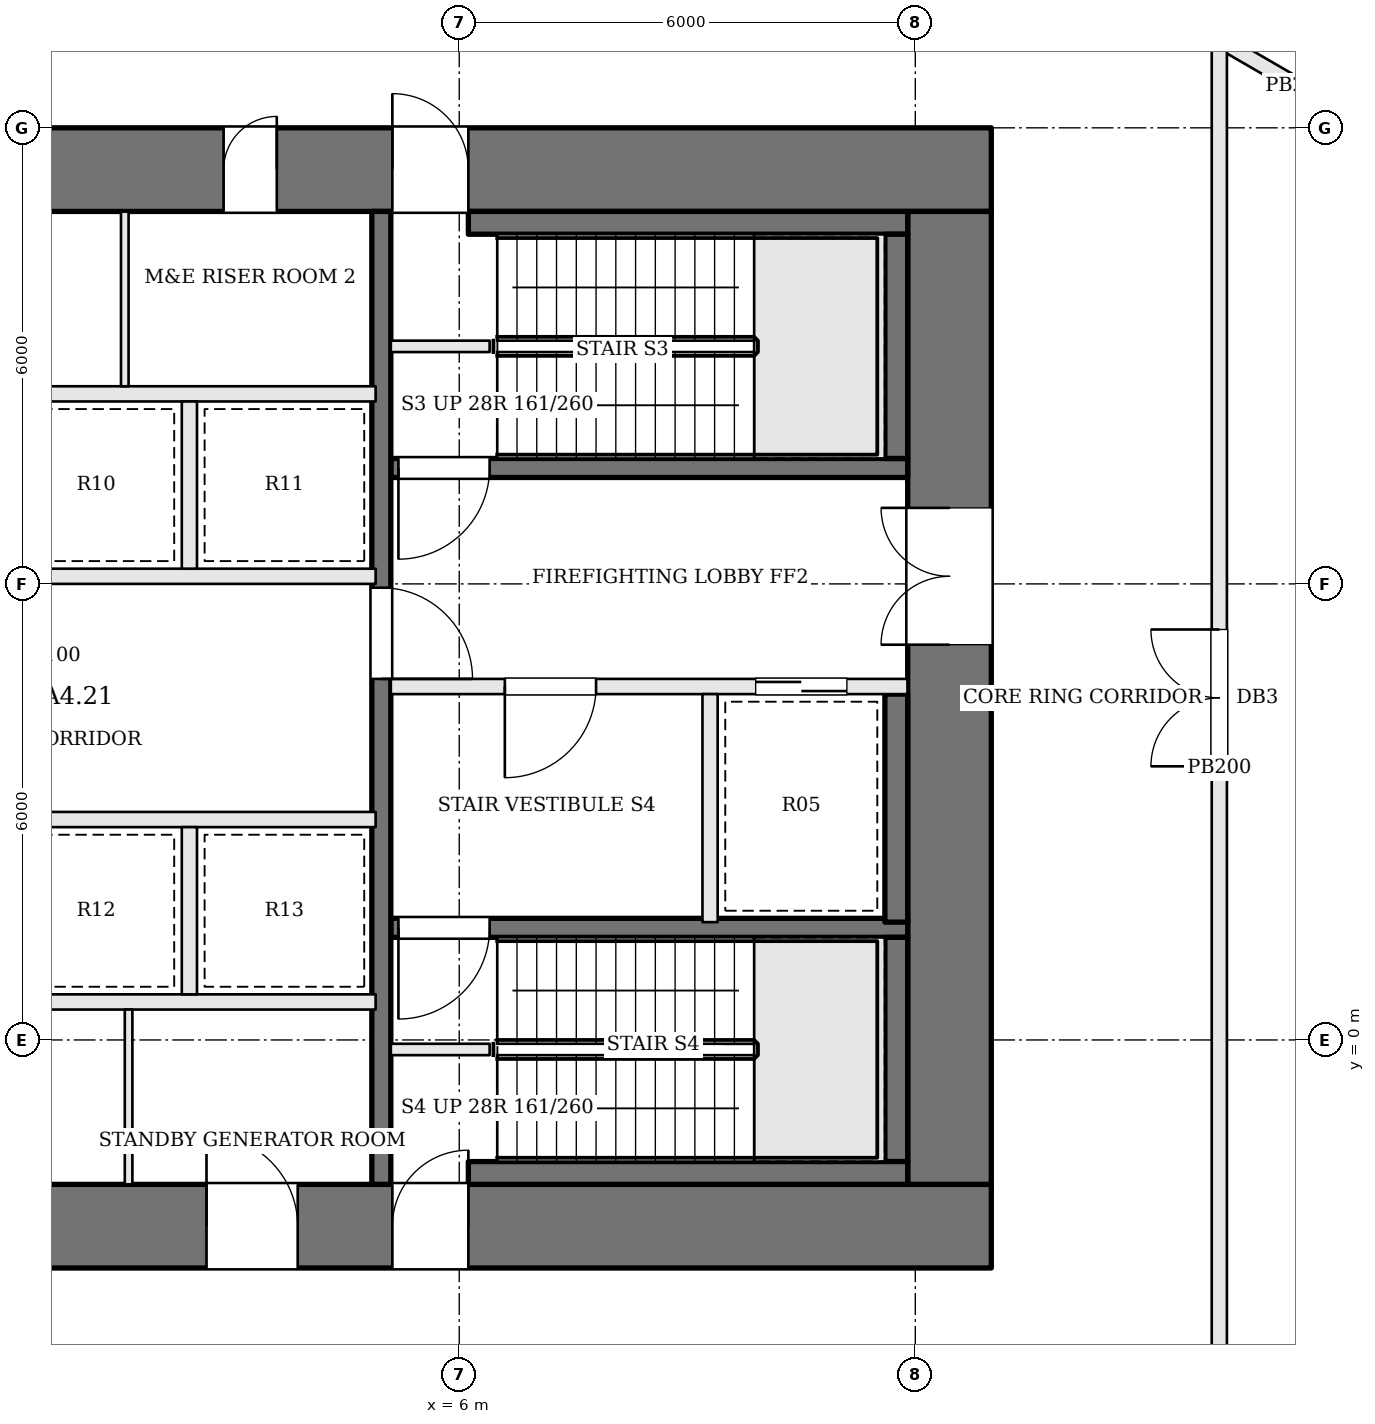
"""IFC4 building model, lengths in metres.
Left out: names, types, materials, properties, quantities, classifications, styles, units other than length and angle.
Written with IfcOpenShell. Run it as: python <this file> out.ifc"""

import sys

from ifc_helpers import new_model, si_unit, direction, frame, frame_2d, origin, place, context, subcontext, project, spatial, rectangle, extrude, element, fill, save


model = new_model("IFC4")
c1 = context("Model", 3, precision=1e-05, world=origin(), true_north=direction((0.0, 1.0)))
c2 = subcontext(c1, "Body", "Model", "MODEL_VIEW")
j1 = project(units=[si_unit("LENGTHUNIT", "METRE"), si_unit("PLANEANGLEUNIT", "RADIAN")], contexts=[c1])
p1 = place(None, origin())
s1 = spatial("IfcSite", under=j1, at=p1, CompositionType="ELEMENT")
p2 = place(p1, origin())
s2 = spatial("IfcBuilding", under=s1, at=p2, CompositionType="ELEMENT")
p3 = place(p2, frame((0.0, 0.0, 77.1)))
s3 = spatial("IfcBuildingStorey", under=s2, at=p3, CompositionType="ELEMENT", Elevation=77.1)
p4 = place(p3, frame((-13.0, 11.45, 0.0), z_axis=(0.0, 0.0, 1.0), x_axis=(1.0, 0.0, 0.0)))
e1 = element("IfcWall", 1, at=p4, inside=s3, PredefinedType="SHEAR", context=c2, shape_type="SweptSolid", body=[
    extrude(rectangle(XDim=26.0, YDim=1.1, at=frame_2d((13.0, 0.0))), origin(), (0.0, 0.0, 1.0), 4.5),
])
p5 = place(p4, frame((9.125, 0.0, 0.0)))
e2 = element("IfcOpeningElement", 2, at=p5, cuts=e1, PredefinedType="OPENING", context=c2, shape_type="SweptSolid", body=[
    extrude(rectangle(XDim=1.2, YDim=2.1, at=frame_2d((0.6, 1.05))), frame((0.0, 0.56, 0.0), z_axis=(0.0, -1.0, 0.0), x_axis=(1.0, 0.0, 0.0)), (0.0, 0.0, 1.0), 1.12),
])
p6 = place(p4, frame((12.375, 0.0, 0.0)))
e3 = element("IfcOpeningElement", 3, at=p6, cuts=e1, PredefinedType="OPENING", context=c2, shape_type="SweptSolid", body=[
    extrude(rectangle(XDim=1.2, YDim=2.1, at=frame_2d((0.6, 1.05))), frame((0.0, 0.56, 0.0), z_axis=(0.0, -1.0, 0.0), x_axis=(1.0, 0.0, 0.0)), (0.0, 0.0, 1.0), 1.12),
])
p7 = place(p4, frame((15.9, 0.0, 0.0)))
e4 = element("IfcOpeningElement", 4, at=p7, cuts=e1, PredefinedType="OPENING", context=c2, shape_type="SweptSolid", body=[
    extrude(rectangle(XDim=0.7, YDim=2.1, at=frame_2d((0.35, 1.05))), frame((0.0, 0.56, 0.0), z_axis=(0.0, -1.0, 0.0), x_axis=(1.0, 0.0, 0.0)), (0.0, 0.0, 1.0), 1.12),
])
p8 = place(p4, frame((6.88, 0.0, 0.0)))
e5 = element("IfcOpeningElement", 5, at=p8, cuts=e1, PredefinedType="OPENING", context=c2, shape_type="SweptSolid", body=[
    extrude(rectangle(XDim=1.0, YDim=2.1, at=frame_2d((0.5, 1.05))), frame((0.0, 0.56, 0.0), z_axis=(0.0, -1.0, 0.0), x_axis=(1.0, 0.0, 0.0)), (0.0, 0.0, 1.0), 1.12),
])
p9 = place(p4, frame((18.12, 0.0, 0.0)))
e6 = element("IfcOpeningElement", 6, at=p9, cuts=e1, PredefinedType="OPENING", context=c2, shape_type="SweptSolid", body=[
    extrude(rectangle(XDim=1.0, YDim=2.1, at=frame_2d((0.5, 1.05))), frame((0.0, 0.56, 0.0), z_axis=(0.0, -1.0, 0.0), x_axis=(1.0, 0.0, 0.0)), (0.0, 0.0, 1.0), 1.12),
])
p10 = place(p3, frame((-13.0, -2.45, 0.0), z_axis=(0.0, 0.0, 1.0), x_axis=(1.0, 0.0, 0.0)))
e7 = element("IfcWall", 7, at=p10, inside=s3, PredefinedType="SHEAR", context=c2, shape_type="SweptSolid", body=[
    extrude(rectangle(XDim=26.0, YDim=1.1, at=frame_2d((13.0, 0.0))), origin(), (0.0, 0.0, 1.0), 4.5),
])
p11 = place(p10, frame((8.975, 0.0, 0.0)))
e8 = element("IfcOpeningElement", 8, at=p11, cuts=e7, PredefinedType="OPENING", context=c2, shape_type="SweptSolid", body=[
    extrude(rectangle(XDim=0.7, YDim=2.1, at=frame_2d((0.35, 1.05))), frame((0.0, 0.56, 0.0), z_axis=(0.0, -1.0, 0.0), x_axis=(1.0, 0.0, 0.0)), (0.0, 0.0, 1.0), 1.12),
])
p12 = place(p10, frame((12.0, 0.0, 0.0)))
e9 = element("IfcOpeningElement", 9, at=p12, cuts=e7, PredefinedType="OPENING", context=c2, shape_type="SweptSolid", body=[
    extrude(rectangle(XDim=1.2, YDim=2.1, at=frame_2d((0.6, 1.05))), frame((0.0, 0.56, 0.0), z_axis=(0.0, -1.0, 0.0), x_axis=(1.0, 0.0, 0.0)), (0.0, 0.0, 1.0), 1.12),
])
p13 = place(p10, frame((15.675, 0.0, 0.0)))
e10 = element("IfcOpeningElement", 10, at=p13, cuts=e7, PredefinedType="OPENING", context=c2, shape_type="SweptSolid", body=[
    extrude(rectangle(XDim=1.2, YDim=2.1, at=frame_2d((0.6, 1.05))), frame((0.0, 0.56, 0.0), z_axis=(0.0, -1.0, 0.0), x_axis=(1.0, 0.0, 0.0)), (0.0, 0.0, 1.0), 1.12),
])
p14 = place(p10, frame((6.88, 0.0, 0.0)))
e11 = element("IfcOpeningElement", 11, at=p14, cuts=e7, PredefinedType="OPENING", context=c2, shape_type="SweptSolid", body=[
    extrude(rectangle(XDim=1.0, YDim=2.1, at=frame_2d((0.5, 1.05))), frame((0.0, 0.56, 0.0), z_axis=(0.0, -1.0, 0.0), x_axis=(1.0, 0.0, 0.0)), (0.0, 0.0, 1.0), 1.12),
])
p15 = place(p10, frame((18.12, 0.0, 0.0)))
e12 = element("IfcOpeningElement", 12, at=p15, cuts=e7, PredefinedType="OPENING", context=c2, shape_type="SweptSolid", body=[
    extrude(rectangle(XDim=1.0, YDim=2.1, at=frame_2d((0.5, 1.05))), frame((0.0, 0.56, 0.0), z_axis=(0.0, -1.0, 0.0), x_axis=(1.0, 0.0, 0.0)), (0.0, 0.0, 1.0), 1.12),
])
p16 = place(p3, frame((12.45, -1.9, 0.0), z_axis=(0.0, 0.0, 1.0), x_axis=(0.0, 1.0, 0.0)))
e13 = element("IfcWall", 13, at=p16, inside=s3, PredefinedType="SHEAR", context=c2, shape_type="SweptSolid", body=[
    extrude(rectangle(XDim=12.8, YDim=1.1, at=frame_2d((6.4, 0.0))), origin(), (0.0, 0.0, 1.0), 4.5),
])
p17 = place(p16, frame((7.1, 0.0, 0.0)))
e14 = element("IfcOpeningElement", 14, at=p17, cuts=e13, PredefinedType="OPENING", context=c2, shape_type="SweptSolid", body=[
    extrude(rectangle(XDim=1.8, YDim=2.1, at=frame_2d((0.9, 1.05))), frame((0.0, 0.56, 0.0), z_axis=(0.0, -1.0, 0.0), x_axis=(1.0, 0.0, 0.0)), (0.0, 0.0, 1.0), 1.12),
])
for number, where, z_axis, x_axis in (
    (15, (6.4, 9.125, 0.0), (0.0, 0.0, 1.0), (-1.0, 0.0, 0.0)),
    (16, (6.4, -0.125, 0.0), (0.0, 0.0, 1.0), (-1.0, 0.0, 0.0)),
):
    element("IfcWall", number, at=place(p3, frame(where, z_axis=z_axis, x_axis=x_axis)), inside=s3, PredefinedType="SOLIDWALL", context=c2, shape_type="SweptSolid", body=[
        extrude(rectangle(XDim=1.3, YDim=0.15, at=frame_2d((0.65, 0.0))), origin(), (0.0, 0.0, 1.0), 4.3),
    ])
p18 = place(p3, frame((11.9, 7.525, 0.0), z_axis=(0.0, 0.0, 1.0), x_axis=(-1.0, 0.0, 0.0)))
e17 = element("IfcWall", 17, at=p18, inside=s3, PredefinedType="SOLIDWALL", context=c2, shape_type="SweptSolid", body=[
    extrude(rectangle(XDim=6.8, YDim=0.25, at=frame_2d((3.4, 0.0))), origin(), (0.0, 0.0, 1.0), 4.3),
])
p19 = place(p18, frame((5.5, 0.0, 0.0)))
e18 = element("IfcOpeningElement", 18, at=p19, cuts=e17, PredefinedType="OPENING", context=c2, shape_type="SweptSolid", body=[
    extrude(rectangle(XDim=1.2, YDim=2.1, at=frame_2d((0.6, 1.05))), frame((0.0, 0.135, 0.0), z_axis=(0.0, -1.0, 0.0), x_axis=(1.0, 0.0, 0.0)), (0.0, 0.0, 1.0), 0.27),
])
p20 = place(p3, frame((11.9, 4.65, 0.0), z_axis=(0.0, 0.0, 1.0), x_axis=(-1.0, 0.0, 0.0)))
e19 = element("IfcWall", 19, at=p20, inside=s3, PredefinedType="SOLIDWALL", context=c2, shape_type="SweptSolid", body=[
    extrude(rectangle(XDim=6.8, YDim=0.2, at=frame_2d((3.4, 0.0))), origin(), (0.0, 0.0, 1.0), 4.3),
])
p21 = place(p20, frame((4.1, 0.0, 0.0)))
e20 = element("IfcOpeningElement", 20, at=p21, cuts=e19, PredefinedType="OPENING", context=c2, shape_type="SweptSolid", body=[
    extrude(rectangle(XDim=1.2, YDim=2.1, at=frame_2d((0.6, 1.05))), frame((0.0, 0.11, 0.0), z_axis=(0.0, -1.0, 0.0), x_axis=(1.0, 0.0, 0.0)), (0.0, 0.0, 1.0), 0.22),
])
p22 = place(p20, frame((0.8, 0.0, 0.0)))
e21 = element("IfcOpeningElement", 21, at=p22, cuts=e19, PredefinedType="OPENING", context=c2, shape_type="SweptSolid", body=[
    extrude(rectangle(XDim=1.2, YDim=2.1, at=frame_2d((0.6, 1.05))), frame((0.0, 0.11, 0.0), z_axis=(0.0, -1.0, 0.0), x_axis=(1.0, 0.0, 0.0)), (0.0, 0.0, 1.0), 0.22),
])
p23 = place(p3, frame((11.9, 1.475, 0.0), z_axis=(0.0, 0.0, 1.0), x_axis=(-1.0, 0.0, 0.0)))
e22 = element("IfcWall", 22, at=p23, inside=s3, PredefinedType="SOLIDWALL", context=c2, shape_type="SweptSolid", body=[
    extrude(rectangle(XDim=6.8, YDim=0.25, at=frame_2d((3.4, 0.0))), origin(), (0.0, 0.0, 1.0), 4.3),
])
p24 = place(p23, frame((5.5, 0.0, 0.0)))
e23 = element("IfcOpeningElement", 23, at=p24, cuts=e22, PredefinedType="OPENING", context=c2, shape_type="SweptSolid", body=[
    extrude(rectangle(XDim=1.2, YDim=2.1, at=frame_2d((0.6, 1.05))), frame((0.0, 0.135, 0.0), z_axis=(0.0, -1.0, 0.0), x_axis=(1.0, 0.0, 0.0)), (0.0, 0.0, 1.0), 0.27),
])
p25 = place(p3, frame((9.3, 4.55, 0.0), z_axis=(0.0, 0.0, 1.0), x_axis=(0.0, -1.0, 0.0)))
e24 = element("IfcWall", 24, at=p25, inside=s3, PredefinedType="SOLIDWALL", context=c2, shape_type="SweptSolid", body=[
    extrude(rectangle(XDim=3.0, YDim=0.2, at=frame_2d((1.5, 0.0))), origin(), (0.0, 0.0, 1.0), 4.3),
])
p26 = place(p3, frame((4.975, 10.9, 0.0), z_axis=(0.0, 0.0, 1.0), x_axis=(0.0, -1.0, 0.0)))
e25 = element("IfcWall", 25, at=p26, inside=s3, PredefinedType="SOLIDWALL", context=c2, shape_type="SweptSolid", body=[
    extrude(rectangle(XDim=12.8, YDim=0.25, at=frame_2d((6.4, 0.0))), origin(), (0.0, 0.0, 1.0), 4.3),
])
p27 = place(p26, frame((4.95, 0.0, 0.0)))
e26 = element("IfcOpeningElement", 26, at=p27, cuts=e25, PredefinedType="OPENING", context=c2, shape_type="SweptSolid", body=[
    extrude(rectangle(XDim=1.2, YDim=2.1, at=frame_2d((0.6, 1.05))), frame((0.0, 0.135, 0.0), z_axis=(0.0, -1.0, 0.0), x_axis=(1.0, 0.0, 0.0)), (0.0, 0.0, 1.0), 0.27),
])
p28 = place(p3, frame((11.9, 10.75, 0.0), z_axis=(0.0, 0.0, 1.0), x_axis=(-1.0, 0.0, 0.0)))
e27 = element("IfcWall", 27, at=p28, inside=s3, PredefinedType="SOLIDWALL", context=c2, shape_type="SweptSolid", body=[
    extrude(rectangle(XDim=5.78, YDim=0.3, at=frame_2d((2.89, 0.0))), origin(), (0.0, 0.0, 1.0), 4.3),
])
p29 = place(p3, frame((11.75, 10.6, 0.0), z_axis=(0.0, 0.0, 1.0), x_axis=(0.0, -1.0, 0.0)))
e28 = element("IfcWall", 28, at=p29, inside=s3, PredefinedType="SOLIDWALL", context=c2, shape_type="SweptSolid", body=[
    extrude(rectangle(XDim=2.95, YDim=0.3, at=frame_2d((1.475, 0.0))), origin(), (0.0, 0.0, 1.0), 4.3),
])
p30 = place(p3, frame((11.75, 4.55, 0.0), z_axis=(0.0, 0.0, 1.0), x_axis=(0.0, -1.0, 0.0)))
e29 = element("IfcWall", 29, at=p30, inside=s3, PredefinedType="SOLIDWALL", context=c2, shape_type="SweptSolid", body=[
    extrude(rectangle(XDim=3.0, YDim=0.3, at=frame_2d((1.5, 0.0))), origin(), (0.0, 0.0, 1.0), 4.3),
])
p31 = place(p3, frame((11.75, 1.35, 0.0), z_axis=(0.0, 0.0, 1.0), x_axis=(0.0, -1.0, 0.0)))
e30 = element("IfcWall", 30, at=p31, inside=s3, PredefinedType="SOLIDWALL", context=c2, shape_type="SweptSolid", body=[
    extrude(rectangle(XDim=2.95, YDim=0.3, at=frame_2d((1.475, 0.0))), origin(), (0.0, 0.0, 1.0), 4.3),
])
p32 = place(p3, frame((11.9, -1.75, 0.0), z_axis=(0.0, 0.0, 1.0), x_axis=(-1.0, 0.0, 0.0)))
e31 = element("IfcWall", 31, at=p32, inside=s3, PredefinedType="SOLIDWALL", context=c2, shape_type="SweptSolid", body=[
    extrude(rectangle(XDim=5.78, YDim=0.3, at=frame_2d((2.89, 0.0))), origin(), (0.0, 0.0, 1.0), 4.3),
])
for number, where, z_axis, x_axis in (
    (32, (-4.9, 0.5, 0.0), (0.0, 0.0, 1.0), (1.0, 0.0, 0.0)),
    (33, (-4.9, 2.9, 0.0), (0.0, 0.0, 1.0), (1.0, 0.0, 0.0)),
    (34, (-4.9, 6.1, 0.0), (0.0, 0.0, 1.0), (1.0, 0.0, 0.0)),
    (35, (-4.9, 8.5, 0.0), (0.0, 0.0, 1.0), (1.0, 0.0, 0.0)),
):
    element("IfcWall", number, at=place(p3, frame(where, z_axis=z_axis, x_axis=x_axis)), inside=s3, PredefinedType="SOLIDWALL", context=c2, shape_type="SweptSolid", body=[
        extrude(rectangle(XDim=9.8, YDim=0.2, at=frame_2d((4.9, 0.0))), origin(), (0.0, 0.0, 1.0), 4.3),
    ])
for number, where, z_axis, x_axis in (
    (36, (2.45, 0.6, 0.0), (0.0, 0.0, 1.0), (0.0, 1.0, 0.0)),
    (37, (2.45, 6.2, 0.0), (0.0, 0.0, 1.0), (0.0, 1.0, 0.0)),
):
    element("IfcWall", number, at=place(p3, frame(where, z_axis=z_axis, x_axis=x_axis)), inside=s3, PredefinedType="SOLIDWALL", context=c2, shape_type="SweptSolid", body=[
        extrude(rectangle(XDim=2.2, YDim=0.2, at=frame_2d((1.1, 0.0))), origin(), (0.0, 0.0, 1.0), 4.3),
    ])
for number, where, z_axis, x_axis in (
    (38, (1.65, -1.9, 0.0), (0.0, 0.0, 1.0), (0.0, 1.0, 0.0)),
    (39, (1.6, 8.6, 0.0), (0.0, 0.0, 1.0), (0.0, 1.0, 0.0)),
):
    element("IfcWall", number, at=place(p3, frame(where, z_axis=z_axis, x_axis=x_axis)), inside=s3, PredefinedType="PARTITIONING", context=c2, shape_type="SweptSolid", body=[
        extrude(rectangle(XDim=2.3, YDim=0.1, at=frame_2d((1.15, 0.0))), origin(), (0.0, 0.0, 1.0), 4.3),
    ])
p33 = place(p3, frame((15.913, 13.202, 0.0), z_axis=(0.0, 0.0, 1.0), x_axis=(0.86524014554, -0.501357647339, 0.0)))
e40 = element("IfcWall", 40, at=p33, inside=s3, PredefinedType="PARTITIONING", context=c2, shape_type="SweptSolid", body=[
    extrude(rectangle(XDim=2.575, YDim=0.2, at=frame_2d((1.288, 0.0))), origin(), (0.0, 0.0, 1.0), 4.3),
])
p34 = place(p3, frame((16.0, -5.9, 0.0), z_axis=(0.0, 0.0, 1.0), x_axis=(0.0, 1.0, 0.0)))
e41 = element("IfcWall", 41, at=p34, inside=s3, PredefinedType="PARTITIONING", context=c2, shape_type="SweptSolid", body=[
    extrude(rectangle(XDim=18.952, YDim=0.2, at=frame_2d((9.476, 0.0))), origin(), (0.0, 0.0, 1.0), 4.3),
])
p35 = place(p34, frame((9.5, 0.0, 0.0)))
e42 = element("IfcOpeningElement", 42, at=p35, cuts=e41, PredefinedType="OPENING", context=c2, shape_type="SweptSolid", body=[
    extrude(rectangle(XDim=1.8, YDim=2.1, at=frame_2d((0.9, 1.05))), frame((0.0, 0.11, 0.0), z_axis=(0.0, -1.0, 0.0), x_axis=(1.0, 0.0, 0.0)), (0.0, 0.0, 1.0), 0.22),
])
p36 = place(p17, origin())
e43 = element("IfcDoor", 43, at=p36, inside=s3, OperationType="DOUBLE_DOOR_SINGLE_SWING", PredefinedType="DOOR", context=c2, shape_type="SweptSolid", body=[
    extrude(rectangle(XDim=1.8, YDim=2.1, at=frame_2d((0.9, 1.05))), frame((0.0, 0.025, 0.0), z_axis=(0.0, -1.0, 0.0), x_axis=(1.0, 0.0, 0.0)), (0.0, 0.0, 1.0), 0.05),
])
fill(e14, e43)
p37 = place(p27, origin())
e44 = element("IfcDoor", 44, at=p37, inside=s3, OperationType="SINGLE_SWING_RIGHT", PredefinedType="DOOR", context=c2, shape_type="SweptSolid", body=[
    extrude(rectangle(XDim=1.2, YDim=2.1, at=frame_2d((0.6, 1.05))), frame((0.0, 0.025, 0.0), z_axis=(0.0, -1.0, 0.0), x_axis=(1.0, 0.0, 0.0)), (0.0, 0.0, 1.0), 0.05),
])
fill(e26, e44)
p38 = place(p21, origin())
e45 = element("IfcDoor", 45, at=p38, inside=s3, OperationType="SINGLE_SWING_RIGHT", PredefinedType="DOOR", context=c2, shape_type="SweptSolid", body=[
    extrude(rectangle(XDim=1.2, YDim=2.1, at=frame_2d((0.6, 1.05))), frame((0.0, 0.025, 0.0), z_axis=(0.0, -1.0, 0.0), x_axis=(1.0, 0.0, 0.0)), (0.0, 0.0, 1.0), 0.05),
])
fill(e20, e45)
p39 = place(p19, origin())
e46 = element("IfcDoor", 46, at=p39, inside=s3, OperationType="SINGLE_SWING_RIGHT", PredefinedType="DOOR", context=c2, shape_type="SweptSolid", body=[
    extrude(rectangle(XDim=1.2, YDim=2.1, at=frame_2d((0.6, 1.05))), frame((0.0, 0.025, 0.0), z_axis=(0.0, -1.0, 0.0), x_axis=(1.0, 0.0, 0.0)), (0.0, 0.0, 1.0), 0.05),
])
fill(e18, e46)
p40 = place(p24, origin())
e47 = element("IfcDoor", 47, at=p40, inside=s3, OperationType="SINGLE_SWING_RIGHT", PredefinedType="DOOR", context=c2, shape_type="SweptSolid", body=[
    extrude(rectangle(XDim=1.2, YDim=2.1, at=frame_2d((0.6, 1.05))), frame((0.0, 0.025, 0.0), z_axis=(0.0, -1.0, 0.0), x_axis=(1.0, 0.0, 0.0)), (0.0, 0.0, 1.0), 0.05),
])
fill(e23, e47)
p41 = place(p22, origin())
e48 = element("IfcDoor", 48, at=p41, inside=s3, OperationType="SLIDING_TO_RIGHT", PredefinedType="DOOR", context=c2, shape_type="SweptSolid", body=[
    extrude(rectangle(XDim=1.2, YDim=2.1, at=frame_2d((0.6, 1.05))), frame((0.0, 0.025, 0.0), z_axis=(0.0, -1.0, 0.0), x_axis=(1.0, 0.0, 0.0)), (0.0, 0.0, 1.0), 0.05),
])
fill(e21, e48)
p42 = place(p13, origin())
e49 = element("IfcDoor", 49, at=p42, inside=s3, OperationType="SINGLE_SWING_LEFT", PredefinedType="DOOR", context=c2, shape_type="SweptSolid", body=[
    extrude(rectangle(XDim=1.2, YDim=2.1, at=frame_2d((0.6, 1.05))), frame((0.0, 0.025, 0.0), z_axis=(0.0, -1.0, 0.0), x_axis=(1.0, 0.0, 0.0)), (0.0, 0.0, 1.0), 0.05),
])
fill(e10, e49)
p43 = place(p7, origin())
e50 = element("IfcDoor", 50, at=p43, inside=s3, OperationType="SINGLE_SWING_RIGHT", PredefinedType="DOOR", context=c2, shape_type="SweptSolid", body=[
    extrude(rectangle(XDim=0.7, YDim=2.1, at=frame_2d((0.35, 1.05))), frame((0.0, 0.025, 0.0), z_axis=(0.0, -1.0, 0.0), x_axis=(1.0, 0.0, 0.0)), (0.0, 0.0, 1.0), 0.05),
])
fill(e4, e50)
p44 = place(p9, origin())
e51 = element("IfcDoor", 51, at=p44, inside=s3, OperationType="SINGLE_SWING_LEFT", PredefinedType="DOOR", context=c2, shape_type="SweptSolid", body=[
    extrude(rectangle(XDim=1.0, YDim=2.1, at=frame_2d((0.5, 1.05))), frame((0.0, 0.025, 0.0), z_axis=(0.0, -1.0, 0.0), x_axis=(1.0, 0.0, 0.0)), (0.0, 0.0, 1.0), 0.05),
])
fill(e6, e51)
p45 = place(p15, origin())
e52 = element("IfcDoor", 52, at=p45, inside=s3, OperationType="SINGLE_SWING_RIGHT", PredefinedType="DOOR", context=c2, shape_type="SweptSolid", body=[
    extrude(rectangle(XDim=1.0, YDim=2.1, at=frame_2d((0.5, 1.05))), frame((0.0, 0.025, 0.0), z_axis=(0.0, -1.0, 0.0), x_axis=(1.0, 0.0, 0.0)), (0.0, 0.0, 1.0), 0.05),
])
fill(e12, e52)
p46 = place(p35, origin())
e53 = element("IfcDoor", 53, at=p46, inside=s3, OperationType="DOUBLE_DOOR_SINGLE_SWING", PredefinedType="DOOR", context=c2, shape_type="SweptSolid", body=[
    extrude(rectangle(XDim=1.8, YDim=2.1, at=frame_2d((0.9, 1.05))), frame((0.0, 0.025, 0.0), z_axis=(0.0, -1.0, 0.0), x_axis=(1.0, 0.0, 0.0)), (0.0, 0.0, 1.0), 0.05),
])
fill(e42, e53)
save(model, sys.argv[1])
